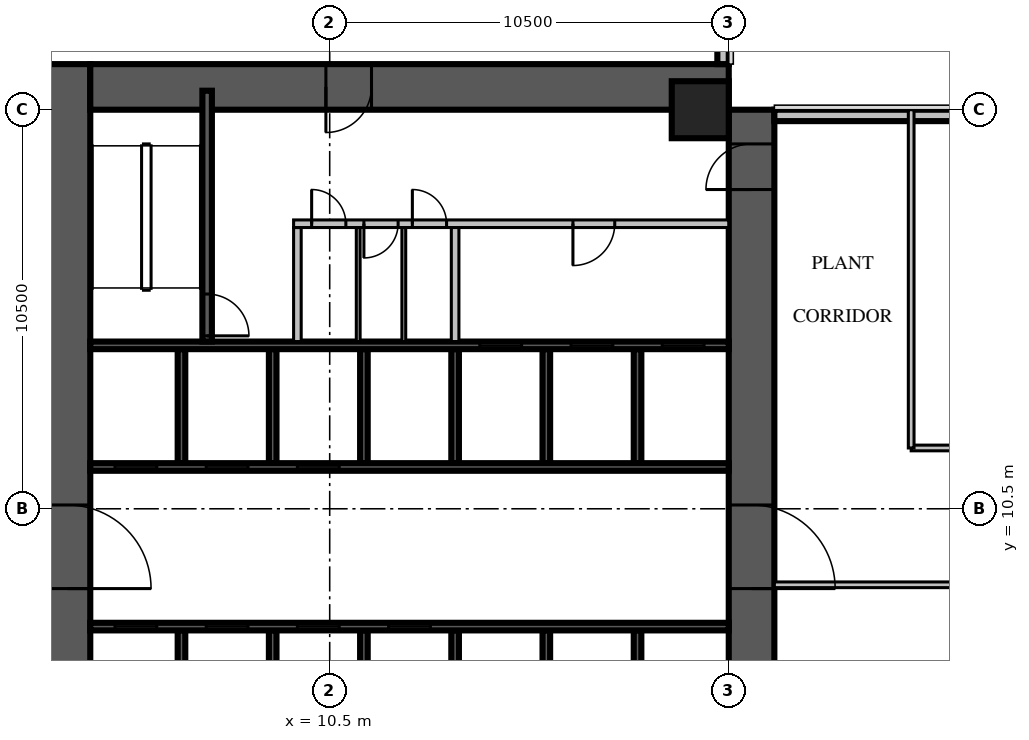
"""IFC4 building model, lengths in metres.
Left out: names, types, materials, properties, quantities, classifications, styles, units other than length and angle.
Written with IfcOpenShell. Run it as: python <this file> out.ifc"""

import sys

from ifc_helpers import new_model, si_unit, direction, frame, frame_2d, origin, origin_2d, place, context, subcontext, project, spatial, rectangle, extrude, source, transform, mapped, element, fill, save


model = new_model("IFC4")
c1 = context("Model", 3, precision=1e-05, world=origin(), true_north=direction((0.0, 1.0)))
c2 = subcontext(c1, "Body", "Model", "MODEL_VIEW")
j1 = project(units=[si_unit("LENGTHUNIT", "METRE"), si_unit("PLANEANGLEUNIT", "RADIAN")], contexts=[c1])
p1 = place(None, origin())
s1 = spatial("IfcSite", under=j1, at=p1, CompositionType="ELEMENT")
p2 = place(p1, origin())
s2 = spatial("IfcBuilding", under=s1, at=p2, CompositionType="ELEMENT")
p3 = place(p2, frame((0.0, 0.0, 34.5)))
s3 = spatial("IfcBuildingStorey", under=s2, at=p3, CompositionType="ELEMENT", Elevation=34.5)
m1 = source(origin(), c2, "Body", "SweptSolid", [
    extrude(rectangle(XDim=1.5, YDim=1.5, at=origin_2d()), origin(), (0.0, 0.0, 1.0), 6.0),
])
p4 = place(p3, frame((20.25, 21.0, 0.0), z_axis=(0.0, 0.0, 1.0), x_axis=(1.0, 0.0, 0.0)))
e1 = element("IfcColumn", 1, at=p4, inside=s3, PredefinedType="COLUMN", context=c2, shape_type="MappedRepresentation", body=[
    mapped(m1, transform((0.0, 0.0, 0.0), scale=1.0)),
])
p5 = place(p3, frame((3.6, 4.2, 0.0), z_axis=(0.0, 0.0, 1.0), x_axis=(0.0, 1.0, 0.0)))
e2 = element("IfcWall", 2, at=p5, inside=s3, PredefinedType="SHEAR", context=c2, shape_type="SweptSolid", body=[
    extrude(rectangle(XDim=18.0, YDim=1.2, at=frame_2d((9.0, 0.0))), origin(), (0.0, 0.0, 1.0), 6.0),
])
m2 = source(origin(), c2, "Body", "SweptSolid", [
    extrude(rectangle(XDim=2.2, YDim=2.1, at=frame_2d((1.1, 1.05))), frame((0.0, 0.61, 0.0), z_axis=(0.0, -1.0, 0.0), x_axis=(1.0, 0.0, 0.0)), (0.0, 0.0, 1.0), 1.22),
])
p6 = place(p5, frame((4.2, 0.0, 0.0)))
e3 = element("IfcOpeningElement", 3, at=p6, cuts=e2, PredefinedType="OPENING", context=c2, shape_type="MappedRepresentation", body=[
    mapped(m2, transform((0.0, 0.0, 0.0), scale=1.0)),
])
p7 = place(p3, frame((21.6, 4.2, 0.0), z_axis=(0.0, 0.0, 1.0), x_axis=(0.0, 1.0, 0.0)))
e4 = element("IfcWall", 4, at=p7, inside=s3, PredefinedType="SHEAR", context=c2, shape_type="SweptSolid", body=[
    extrude(rectangle(XDim=16.8, YDim=1.2, at=frame_2d((8.4, 0.0))), origin(), (0.0, 0.0, 1.0), 6.0),
])
p8 = place(p7, frame((4.2, 0.0, 0.0)))
e5 = element("IfcOpeningElement", 5, at=p8, cuts=e4, PredefinedType="OPENING", context=c2, shape_type="MappedRepresentation", body=[
    mapped(m2, transform((0.0, 0.0, 0.0), scale=1.0)),
])
m3 = source(origin(), c2, "Body", "SweptSolid", [
    extrude(rectangle(XDim=1.2, YDim=2.1, at=frame_2d((0.6, 1.05))), frame((0.0, 0.61, 0.0), z_axis=(0.0, -1.0, 0.0), x_axis=(1.0, 0.0, 0.0)), (0.0, 0.0, 1.0), 1.22),
])
p9 = place(p7, frame((14.7, 0.0, 0.0)))
e6 = element("IfcOpeningElement", 6, at=p9, cuts=e4, PredefinedType="OPENING", context=c2, shape_type="MappedRepresentation", body=[
    mapped(m3, transform((0.0, 0.0, 0.0), scale=1.0)),
])
m4 = source(origin(), c2, "Body", "SweptSolid", [
    extrude(rectangle(XDim=16.8, YDim=1.2, at=frame_2d((8.4, 0.0))), origin(), (0.0, 0.0, 1.0), 6.0),
])
p10 = place(p3, frame((4.2, 21.6, 0.0), z_axis=(0.0, 0.0, 1.0), x_axis=(1.0, 0.0, 0.0)))
e7 = element("IfcWall", 7, at=p10, inside=s3, PredefinedType="SHEAR", context=c2, shape_type="MappedRepresentation", body=[
    mapped(m4, transform((0.0, 0.0, 0.0), scale=1.0)),
])
p11 = place(p10, frame((6.2, 0.0, 0.0)))
e8 = element("IfcOpeningElement", 8, at=p11, cuts=e7, PredefinedType="OPENING", context=c2, shape_type="MappedRepresentation", body=[
    mapped(m3, transform((0.0, 0.0, 0.0), scale=1.0)),
])
p12 = place(p3, frame((37.05, 20.85, 0.0), z_axis=(0.0, 0.0, 1.0), x_axis=(-1.0, 0.0, 0.0)))
e9 = element("IfcWall", 9, at=p12, inside=s3, PredefinedType="STANDARD", context=c2, shape_type="SweptSolid", body=[
    extrude(rectangle(XDim=14.85, YDim=0.3, at=frame_2d((7.425, 0.0))), origin(), (0.0, 0.0, 1.0), 3.6),
])
m5 = source(origin(), c2, "Body", "SweptSolid", [
    extrude(rectangle(XDim=14.85, YDim=0.3, at=frame_2d((7.425, 0.0))), origin(), (0.0, 0.0, 1.0), 3.6),
])
p13 = place(p3, frame((20.85, 22.2, 0.0), z_axis=(0.0, 0.0, 1.0), x_axis=(0.0, 1.0, 0.0)))
e10 = element("IfcWall", 10, at=p13, inside=s3, PredefinedType="STANDARD", context=c2, shape_type="MappedRepresentation", body=[
    mapped(m5, transform((0.0, 0.0, 0.0), scale=1.0)),
])
p14 = place(p3, frame((6.6, 4.2, 0.0), z_axis=(0.0, 0.0, 1.0), x_axis=(0.0, 1.0, 0.0)))
e11 = element("IfcWall", 11, at=p14, inside=s3, PredefinedType="SOLIDWALL", context=c2, shape_type="SweptSolid", body=[
    extrude(rectangle(XDim=3.1, YDim=0.2, at=frame_2d((1.55, 0.0))), origin(), (0.0, 0.0, 1.0), 6.0),
])
m6 = source(origin(), c2, "Body", "SweptSolid", [
    extrude(rectangle(XDim=3.1, YDim=0.2, at=frame_2d((1.55, 0.0))), origin(), (0.0, 0.0, 1.0), 6.0),
])
for number, where, z_axis, x_axis in (
    (12, (9.0, 4.2, 0.0), (0.0, 0.0, 1.0), (0.0, 1.0, 0.0)),
    (13, (11.4, 4.2, 0.0), (0.0, 0.0, 1.0), (0.0, 1.0, 0.0)),
    (14, (13.8, 4.2, 0.0), (0.0, 0.0, 1.0), (0.0, 1.0, 0.0)),
    (15, (16.2, 4.2, 0.0), (0.0, 0.0, 1.0), (0.0, 1.0, 0.0)),
    (16, (18.6, 4.2, 0.0), (0.0, 0.0, 1.0), (0.0, 1.0, 0.0)),
):
    element("IfcWall", number, at=place(p3, frame(where, z_axis=z_axis, x_axis=x_axis)), inside=s3, PredefinedType="SOLIDWALL", context=c2, shape_type="MappedRepresentation", body=[
        mapped(m6, transform((0.0, 0.0, 0.0), scale=1.0)),
    ])
p15 = place(p3, frame((6.6, 11.7, 0.0), z_axis=(0.0, 0.0, 1.0), x_axis=(0.0, 1.0, 0.0)))
e17 = element("IfcWall", 17, at=p15, inside=s3, PredefinedType="SOLIDWALL", context=c2, shape_type="SweptSolid", body=[
    extrude(rectangle(XDim=3.0, YDim=0.2, at=frame_2d((1.5, 0.0))), origin(), (0.0, 0.0, 1.0), 6.0),
])
m7 = source(origin(), c2, "Body", "SweptSolid", [
    extrude(rectangle(XDim=3.0, YDim=0.2, at=frame_2d((1.5, 0.0))), origin(), (0.0, 0.0, 1.0), 6.0),
])
for number, where, z_axis, x_axis in (
    (18, (9.0, 11.7, 0.0), (0.0, 0.0, 1.0), (0.0, 1.0, 0.0)),
    (19, (11.4, 11.7, 0.0), (0.0, 0.0, 1.0), (0.0, 1.0, 0.0)),
    (20, (13.8, 11.7, 0.0), (0.0, 0.0, 1.0), (0.0, 1.0, 0.0)),
    (21, (16.2, 11.7, 0.0), (0.0, 0.0, 1.0), (0.0, 1.0, 0.0)),
    (22, (18.6, 11.7, 0.0), (0.0, 0.0, 1.0), (0.0, 1.0, 0.0)),
):
    element("IfcWall", number, at=place(p3, frame(where, z_axis=z_axis, x_axis=x_axis)), inside=s3, PredefinedType="SOLIDWALL", context=c2, shape_type="MappedRepresentation", body=[
        mapped(m7, transform((0.0, 0.0, 0.0), scale=1.0)),
    ])
p16 = place(p3, frame((4.2, 7.4, 0.0), z_axis=(0.0, 0.0, 1.0), x_axis=(1.0, 0.0, 0.0)))
e23 = element("IfcWall", 23, at=p16, inside=s3, PredefinedType="SOLIDWALL", context=c2, shape_type="SweptSolid", body=[
    extrude(rectangle(XDim=16.8, YDim=0.2, at=frame_2d((8.4, 0.0))), origin(), (0.0, 0.0, 1.0), 6.0),
])
m8 = source(origin(), c2, "Body", "SweptSolid", [
    extrude(rectangle(XDim=1.1, YDim=2.1, at=frame_2d((0.55, 1.05))), frame((0.0, 0.11, 0.0), z_axis=(0.0, -1.0, 0.0), x_axis=(1.0, 0.0, 0.0)), (0.0, 0.0, 1.0), 0.22),
])
p17 = place(p16, frame((0.65, 0.0, 0.0)))
e24 = element("IfcOpeningElement", 24, at=p17, cuts=e23, PredefinedType="OPENING", context=c2, shape_type="MappedRepresentation", body=[
    mapped(m8, transform((0.0, 0.0, 0.0), scale=1.0)),
])
p18 = place(p16, frame((3.05, 0.0, 0.0)))
e25 = element("IfcOpeningElement", 25, at=p18, cuts=e23, PredefinedType="OPENING", context=c2, shape_type="MappedRepresentation", body=[
    mapped(m8, transform((0.0, 0.0, 0.0), scale=1.0)),
])
p19 = place(p16, frame((5.45, 0.0, 0.0)))
e26 = element("IfcOpeningElement", 26, at=p19, cuts=e23, PredefinedType="OPENING", context=c2, shape_type="MappedRepresentation", body=[
    mapped(m8, transform((0.0, 0.0, 0.0), scale=1.0)),
])
p20 = place(p16, frame((7.85, 0.0, 0.0)))
e27 = element("IfcOpeningElement", 27, at=p20, cuts=e23, PredefinedType="OPENING", context=c2, shape_type="MappedRepresentation", body=[
    mapped(m8, transform((0.0, 0.0, 0.0), scale=1.0)),
])
m9 = source(origin(), c2, "Body", "SweptSolid", [
    extrude(rectangle(XDim=16.8, YDim=0.2, at=frame_2d((8.4, 0.0))), origin(), (0.0, 0.0, 1.0), 6.0),
])
p21 = place(p3, frame((4.2, 11.6, 0.0), z_axis=(0.0, 0.0, 1.0), x_axis=(1.0, 0.0, 0.0)))
e28 = element("IfcWall", 28, at=p21, inside=s3, PredefinedType="SOLIDWALL", context=c2, shape_type="MappedRepresentation", body=[
    mapped(m9, transform((0.0, 0.0, 0.0), scale=1.0)),
])
p22 = place(p21, frame((0.65, 0.0, 0.0)))
e29 = element("IfcOpeningElement", 29, at=p22, cuts=e28, PredefinedType="OPENING", context=c2, shape_type="MappedRepresentation", body=[
    mapped(m8, transform((0.0, 0.0, 0.0), scale=1.0)),
])
p23 = place(p21, frame((3.05, 0.0, 0.0)))
e30 = element("IfcOpeningElement", 30, at=p23, cuts=e28, PredefinedType="OPENING", context=c2, shape_type="MappedRepresentation", body=[
    mapped(m8, transform((0.0, 0.0, 0.0), scale=1.0)),
])
p24 = place(p21, frame((5.45, 0.0, 0.0)))
e31 = element("IfcOpeningElement", 31, at=p24, cuts=e28, PredefinedType="OPENING", context=c2, shape_type="MappedRepresentation", body=[
    mapped(m8, transform((0.0, 0.0, 0.0), scale=1.0)),
])
p25 = place(p3, frame((4.2, 14.8, 0.0), z_axis=(0.0, 0.0, 1.0), x_axis=(1.0, 0.0, 0.0)))
e32 = element("IfcWall", 32, at=p25, inside=s3, PredefinedType="SOLIDWALL", context=c2, shape_type="MappedRepresentation", body=[
    mapped(m9, transform((0.0, 0.0, 0.0), scale=1.0)),
])
p26 = place(p25, frame((10.25, 0.0, 0.0)))
e33 = element("IfcOpeningElement", 33, at=p26, cuts=e32, PredefinedType="OPENING", context=c2, shape_type="MappedRepresentation", body=[
    mapped(m8, transform((0.0, 0.0, 0.0), scale=1.0)),
])
p27 = place(p25, frame((12.65, 0.0, 0.0)))
e34 = element("IfcOpeningElement", 34, at=p27, cuts=e32, PredefinedType="OPENING", context=c2, shape_type="MappedRepresentation", body=[
    mapped(m8, transform((0.0, 0.0, 0.0), scale=1.0)),
])
p28 = place(p25, frame((15.05, 0.0, 0.0)))
e35 = element("IfcOpeningElement", 35, at=p28, cuts=e32, PredefinedType="OPENING", context=c2, shape_type="MappedRepresentation", body=[
    mapped(m8, transform((0.0, 0.0, 0.0), scale=1.0)),
])
p29 = place(p3, frame((7.275, 14.9, 0.0), z_axis=(0.0, 0.0, 1.0), x_axis=(0.0, 1.0, 0.0)))
e36 = element("IfcWall", 36, at=p29, inside=s3, PredefinedType="SOLIDWALL", context=c2, shape_type="SweptSolid", body=[
    extrude(rectangle(XDim=6.6, YDim=0.25, at=frame_2d((3.3, 0.0))), origin(), (0.0, 0.0, 1.0), 5.6),
])
m10 = source(origin(), c2, "Body", "SweptSolid", [
    extrude(rectangle(XDim=1.1, YDim=2.1, at=frame_2d((0.55, 1.05))), frame((0.0, 0.135, 0.0), z_axis=(0.0, -1.0, 0.0), x_axis=(1.0, 0.0, 0.0)), (0.0, 0.0, 1.0), 0.27),
])
p30 = place(p29, frame((0.15, 0.0, 0.0)))
e37 = element("IfcOpeningElement", 37, at=p30, cuts=e36, PredefinedType="OPENING", context=c2, shape_type="MappedRepresentation", body=[
    mapped(m10, transform((0.0, 0.0, 0.0), scale=1.0)),
])
p31 = place(p3, frame((9.65, 14.9, 0.0), z_axis=(0.0, 0.0, 1.0), x_axis=(0.0, 1.0, 0.0)))
e38 = element("IfcWall", 38, at=p31, inside=s3, PredefinedType="PARTITIONING", context=c2, shape_type="SweptSolid", body=[
    extrude(rectangle(XDim=3.0, YDim=0.2, at=frame_2d((1.5, 0.0))), origin(), (0.0, 0.0, 1.0), 5.6),
])
p32 = place(p3, frame((9.55, 18.0, 0.0), z_axis=(0.0, 0.0, 1.0), x_axis=(1.0, 0.0, 0.0)))
e39 = element("IfcWall", 39, at=p32, inside=s3, PredefinedType="PARTITIONING", context=c2, shape_type="SweptSolid", body=[
    extrude(rectangle(XDim=11.45, YDim=0.2, at=frame_2d((5.725, 0.0))), origin(), (0.0, 0.0, 1.0), 5.6),
])
m11 = source(origin(), c2, "Body", "SweptSolid", [
    extrude(rectangle(XDim=0.9, YDim=2.1, at=frame_2d((0.45, 1.05))), frame((0.0, 0.11, 0.0), z_axis=(0.0, -1.0, 0.0), x_axis=(1.0, 0.0, 0.0)), (0.0, 0.0, 1.0), 0.22),
])
p33 = place(p32, frame((0.475, 0.0, 0.0)))
e40 = element("IfcOpeningElement", 40, at=p33, cuts=e39, PredefinedType="OPENING", context=c2, shape_type="MappedRepresentation", body=[
    mapped(m11, transform((0.0, 0.0, 0.0), scale=1.0)),
])
p34 = place(p32, frame((1.85, 0.0, 0.0)))
e41 = element("IfcOpeningElement", 41, at=p34, cuts=e39, PredefinedType="OPENING", context=c2, shape_type="MappedRepresentation", body=[
    mapped(m11, transform((0.0, 0.0, 0.0), scale=1.0)),
])
p35 = place(p32, frame((3.125, 0.0, 0.0)))
e42 = element("IfcOpeningElement", 42, at=p35, cuts=e39, PredefinedType="OPENING", context=c2, shape_type="MappedRepresentation", body=[
    mapped(m11, transform((0.0, 0.0, 0.0), scale=1.0)),
])
p36 = place(p32, frame((7.35, 0.0, 0.0)))
e43 = element("IfcOpeningElement", 43, at=p36, cuts=e39, PredefinedType="OPENING", context=c2, shape_type="MappedRepresentation", body=[
    mapped(m8, transform((0.0, 0.0, 0.0), scale=1.0)),
])
m12 = source(origin(), c2, "Body", "SweptSolid", [
    extrude(rectangle(XDim=3.0, YDim=0.2, at=frame_2d((1.5, 0.0))), origin(), (0.0, 0.0, 1.0), 5.6),
])
p37 = place(p3, frame((13.8, 14.9, 0.0), z_axis=(0.0, 0.0, 1.0), x_axis=(0.0, 1.0, 0.0)))
e44 = element("IfcWall", 44, at=p37, inside=s3, PredefinedType="PARTITIONING", context=c2, shape_type="MappedRepresentation", body=[
    mapped(m12, transform((0.0, 0.0, 0.0), scale=1.0)),
])
p38 = place(p3, frame((11.25, 14.9, 0.0), z_axis=(0.0, 0.0, 1.0), x_axis=(0.0, 1.0, 0.0)))
e45 = element("IfcWall", 45, at=p38, inside=s3, PredefinedType="PARTITIONING", context=c2, shape_type="SweptSolid", body=[
    extrude(rectangle(XDim=3.0, YDim=0.1, at=frame_2d((1.5, 0.0))), origin(), (0.0, 0.0, 1.0), 5.6),
])
m13 = source(origin(), c2, "Body", "SweptSolid", [
    extrude(rectangle(XDim=3.0, YDim=0.1, at=frame_2d((1.5, 0.0))), origin(), (0.0, 0.0, 1.0), 5.6),
])
p39 = place(p3, frame((12.45, 14.9, 0.0), z_axis=(0.0, 0.0, 1.0), x_axis=(0.0, 1.0, 0.0)))
e46 = element("IfcWall", 46, at=p39, inside=s3, PredefinedType="PARTITIONING", context=c2, shape_type="MappedRepresentation", body=[
    mapped(m13, transform((0.0, 0.0, 0.0), scale=1.0)),
])
p40 = place(p3, frame((22.2, 8.5, 0.0), z_axis=(0.0, 0.0, 1.0), x_axis=(1.0, 0.0, 0.0)))
e47 = element("IfcWall", 47, at=p40, inside=s3, PredefinedType="PARTITIONING", context=c2, shape_type="SweptSolid", body=[
    extrude(rectangle(XDim=16.2, YDim=0.15, at=frame_2d((8.1, 0.0))), origin(), (0.0, 0.0, 1.0), 5.6),
])
m14 = source(origin(), c2, "Body", "SweptSolid", [
    extrude(rectangle(XDim=1.2, YDim=2.1, at=frame_2d((0.6, 1.05))), frame((0.0, 0.085, 0.0), z_axis=(0.0, -1.0, 0.0), x_axis=(1.0, 0.0, 0.0)), (0.0, 0.0, 1.0), 0.17),
])
p41 = place(p40, frame((5.375, 0.0, 0.0)))
e48 = element("IfcOpeningElement", 48, at=p41, cuts=e47, PredefinedType="OPENING", context=c2, shape_type="MappedRepresentation", body=[
    mapped(m14, transform((0.0, 0.0, 0.0), scale=1.0)),
])
p42 = place(p40, frame((13.475, 0.0, 0.0)))
e49 = element("IfcOpeningElement", 49, at=p42, cuts=e47, PredefinedType="OPENING", context=c2, shape_type="MappedRepresentation", body=[
    mapped(m14, transform((0.0, 0.0, 0.0), scale=1.0)),
])
p43 = place(p3, frame((25.8, 12.1, 0.0), z_axis=(0.0, 0.0, 1.0), x_axis=(1.0, 0.0, 0.0)))
e50 = element("IfcWall", 50, at=p43, inside=s3, PredefinedType="PARTITIONING", context=c2, shape_type="SweptSolid", body=[
    extrude(rectangle(XDim=44.2, YDim=0.15, at=frame_2d((22.1, 0.0))), origin(), (0.0, 0.0, 1.0), 5.6),
])
p44 = place(p43, frame((4.925, 0.0, 0.0)))
e51 = element("IfcOpeningElement", 51, at=p44, cuts=e50, PredefinedType="OPENING", context=c2, shape_type="MappedRepresentation", body=[
    mapped(m14, transform((0.0, 0.0, 0.0), scale=1.0)),
])
p45 = place(p43, frame((15.975, 0.0, 0.0)))
e52 = element("IfcOpeningElement", 52, at=p45, cuts=e50, PredefinedType="OPENING", context=c2, shape_type="MappedRepresentation", body=[
    mapped(m14, transform((0.0, 0.0, 0.0), scale=1.0)),
])
p46 = place(p43, frame((27.55, 0.0, 0.0)))
e53 = element("IfcOpeningElement", 53, at=p46, cuts=e50, PredefinedType="OPENING", context=c2, shape_type="MappedRepresentation", body=[
    mapped(m14, transform((0.0, 0.0, 0.0), scale=1.0)),
])
p47 = place(p43, frame((39.1, 0.0, 0.0)))
e54 = element("IfcOpeningElement", 54, at=p47, cuts=e50, PredefinedType="OPENING", context=c2, shape_type="MappedRepresentation", body=[
    mapped(m14, transform((0.0, 0.0, 0.0), scale=1.0)),
])
m15 = source(origin(), c2, "Body", "SweptSolid", [
    extrude(rectangle(XDim=8.9, YDim=0.15, at=frame_2d((4.45, 0.0))), origin(), (0.0, 0.0, 1.0), 5.6),
])
p48 = place(p3, frame((25.8, 12.1, 0.0), z_axis=(0.0, 0.0, 1.0), x_axis=(0.0, 1.0, 0.0)))
e55 = element("IfcWall", 55, at=p48, inside=s3, PredefinedType="PARTITIONING", context=c2, shape_type="MappedRepresentation", body=[
    mapped(m15, transform((0.0, 0.0, 0.0), scale=1.0)),
])
m16 = source(origin(), c2, "Body", "SweptSolid", [
    extrude(rectangle(XDim=1.1, YDim=2.1, at=frame_2d((0.55, 1.05))), frame((0.0, 0.025, 0.0), z_axis=(0.0, -1.0, 0.0), x_axis=(1.0, 0.0, 0.0)), (0.0, 0.0, 1.0), 0.05),
])
p49 = place(p17, origin())
e56 = element("IfcDoor", 56, at=p49, inside=s3, OperationType="SLIDING_TO_LEFT", PredefinedType="DOOR", context=c2, shape_type="MappedRepresentation", body=[
    mapped(m16, transform((0.0, 0.0, 0.0), scale=1.0)),
])
fill(e24, e56)
p50 = place(p18, origin())
e57 = element("IfcDoor", 57, at=p50, inside=s3, OperationType="SLIDING_TO_LEFT", PredefinedType="DOOR", context=c2, shape_type="MappedRepresentation", body=[
    mapped(m16, transform((0.0, 0.0, 0.0), scale=1.0)),
])
fill(e25, e57)
p51 = place(p19, origin())
e58 = element("IfcDoor", 58, at=p51, inside=s3, OperationType="SLIDING_TO_LEFT", PredefinedType="DOOR", context=c2, shape_type="MappedRepresentation", body=[
    mapped(m16, transform((0.0, 0.0, 0.0), scale=1.0)),
])
fill(e26, e58)
p52 = place(p20, origin())
e59 = element("IfcDoor", 59, at=p52, inside=s3, OperationType="SLIDING_TO_LEFT", PredefinedType="DOOR", context=c2, shape_type="MappedRepresentation", body=[
    mapped(m16, transform((0.0, 0.0, 0.0), scale=1.0)),
])
fill(e27, e59)
p53 = place(p22, origin())
e60 = element("IfcDoor", 60, at=p53, inside=s3, OperationType="SLIDING_TO_LEFT", PredefinedType="DOOR", context=c2, shape_type="MappedRepresentation", body=[
    mapped(m16, transform((0.0, 0.0, 0.0), scale=1.0)),
])
fill(e29, e60)
p54 = place(p23, origin())
e61 = element("IfcDoor", 61, at=p54, inside=s3, OperationType="SLIDING_TO_LEFT", PredefinedType="DOOR", context=c2, shape_type="MappedRepresentation", body=[
    mapped(m16, transform((0.0, 0.0, 0.0), scale=1.0)),
])
fill(e30, e61)
p55 = place(p24, origin())
e62 = element("IfcDoor", 62, at=p55, inside=s3, OperationType="SLIDING_TO_LEFT", PredefinedType="DOOR", context=c2, shape_type="MappedRepresentation", body=[
    mapped(m16, transform((0.0, 0.0, 0.0), scale=1.0)),
])
fill(e31, e62)
p56 = place(p26, origin())
e63 = element("IfcDoor", 63, at=p56, inside=s3, OperationType="SLIDING_TO_LEFT", PredefinedType="DOOR", context=c2, shape_type="MappedRepresentation", body=[
    mapped(m16, transform((0.0, 0.0, 0.0), scale=1.0)),
])
fill(e33, e63)
p57 = place(p27, origin())
e64 = element("IfcDoor", 64, at=p57, inside=s3, OperationType="SLIDING_TO_LEFT", PredefinedType="DOOR", context=c2, shape_type="MappedRepresentation", body=[
    mapped(m16, transform((0.0, 0.0, 0.0), scale=1.0)),
])
fill(e34, e64)
p58 = place(p28, origin())
e65 = element("IfcDoor", 65, at=p58, inside=s3, OperationType="SLIDING_TO_LEFT", PredefinedType="DOOR", context=c2, shape_type="MappedRepresentation", body=[
    mapped(m16, transform((0.0, 0.0, 0.0), scale=1.0)),
])
fill(e35, e65)
p59 = place(p30, origin())
e66 = element("IfcDoor", 66, at=p59, inside=s3, OperationType="SINGLE_SWING_RIGHT", PredefinedType="DOOR", context=c2, shape_type="MappedRepresentation", body=[
    mapped(m16, transform((0.0, 0.0, 0.0), scale=1.0)),
])
fill(e37, e66)
m17 = source(origin(), c2, "Body", "SweptSolid", [
    extrude(rectangle(XDim=0.9, YDim=2.1, at=frame_2d((0.45, 1.05))), frame((0.0, 0.025, 0.0), z_axis=(0.0, -1.0, 0.0), x_axis=(1.0, 0.0, 0.0)), (0.0, 0.0, 1.0), 0.05),
])
p60 = place(p33, origin())
e67 = element("IfcDoor", 67, at=p60, inside=s3, OperationType="SINGLE_SWING_LEFT", PredefinedType="DOOR", context=c2, shape_type="MappedRepresentation", body=[
    mapped(m17, transform((0.0, 0.0, 0.0), scale=1.0)),
])
fill(e40, e67)
p61 = place(p34, origin())
e68 = element("IfcDoor", 68, at=p61, inside=s3, OperationType="SINGLE_SWING_RIGHT", PredefinedType="DOOR", context=c2, shape_type="MappedRepresentation", body=[
    mapped(m17, transform((0.0, 0.0, 0.0), scale=1.0)),
])
fill(e41, e68)
p62 = place(p35, origin())
e69 = element("IfcDoor", 69, at=p62, inside=s3, OperationType="SINGLE_SWING_LEFT", PredefinedType="DOOR", context=c2, shape_type="MappedRepresentation", body=[
    mapped(m17, transform((0.0, 0.0, 0.0), scale=1.0)),
])
fill(e42, e69)
p63 = place(p36, origin())
e70 = element("IfcDoor", 70, at=p63, inside=s3, OperationType="SINGLE_SWING_RIGHT", PredefinedType="DOOR", context=c2, shape_type="MappedRepresentation", body=[
    mapped(m16, transform((0.0, 0.0, 0.0), scale=1.0)),
])
fill(e43, e70)
m18 = source(origin(), c2, "Body", "SweptSolid", [
    extrude(rectangle(XDim=2.2, YDim=2.1, at=frame_2d((1.1, 1.05))), frame((0.0, 0.025, 0.0), z_axis=(0.0, -1.0, 0.0), x_axis=(1.0, 0.0, 0.0)), (0.0, 0.0, 1.0), 0.05),
])
p64 = place(p8, origin())
e71 = element("IfcDoor", 71, at=p64, inside=s3, OperationType="DOUBLE_DOOR_SINGLE_SWING", PredefinedType="DOOR", context=c2, shape_type="MappedRepresentation", body=[
    mapped(m18, transform((0.0, 0.0, 0.0), scale=1.0)),
])
fill(e5, e71)
p65 = place(p6, origin())
e72 = element("IfcDoor", 72, at=p65, inside=s3, OperationType="DOUBLE_DOOR_SINGLE_SWING", PredefinedType="DOOR", context=c2, shape_type="MappedRepresentation", body=[
    mapped(m18, transform((0.0, 0.0, 0.0), scale=1.0)),
])
fill(e3, e72)
m19 = source(origin(), c2, "Body", "SweptSolid", [
    extrude(rectangle(XDim=1.2, YDim=2.1, at=frame_2d((0.6, 1.05))), frame((0.0, 0.025, 0.0), z_axis=(0.0, -1.0, 0.0), x_axis=(1.0, 0.0, 0.0)), (0.0, 0.0, 1.0), 0.05),
])
p66 = place(p11, origin())
e73 = element("IfcDoor", 73, at=p66, inside=s3, OperationType="SINGLE_SWING_RIGHT", PredefinedType="DOOR", context=c2, shape_type="MappedRepresentation", body=[
    mapped(m19, transform((0.0, 0.0, 0.0), scale=1.0)),
])
fill(e8, e73)
p67 = place(p9, origin())
e74 = element("IfcDoor", 74, at=p67, inside=s3, OperationType="SINGLE_SWING_LEFT", PredefinedType="DOOR", context=c2, shape_type="MappedRepresentation", body=[
    mapped(m19, transform((0.0, 0.0, 0.0), scale=1.0)),
])
fill(e6, e74)
save(model, sys.argv[1])
